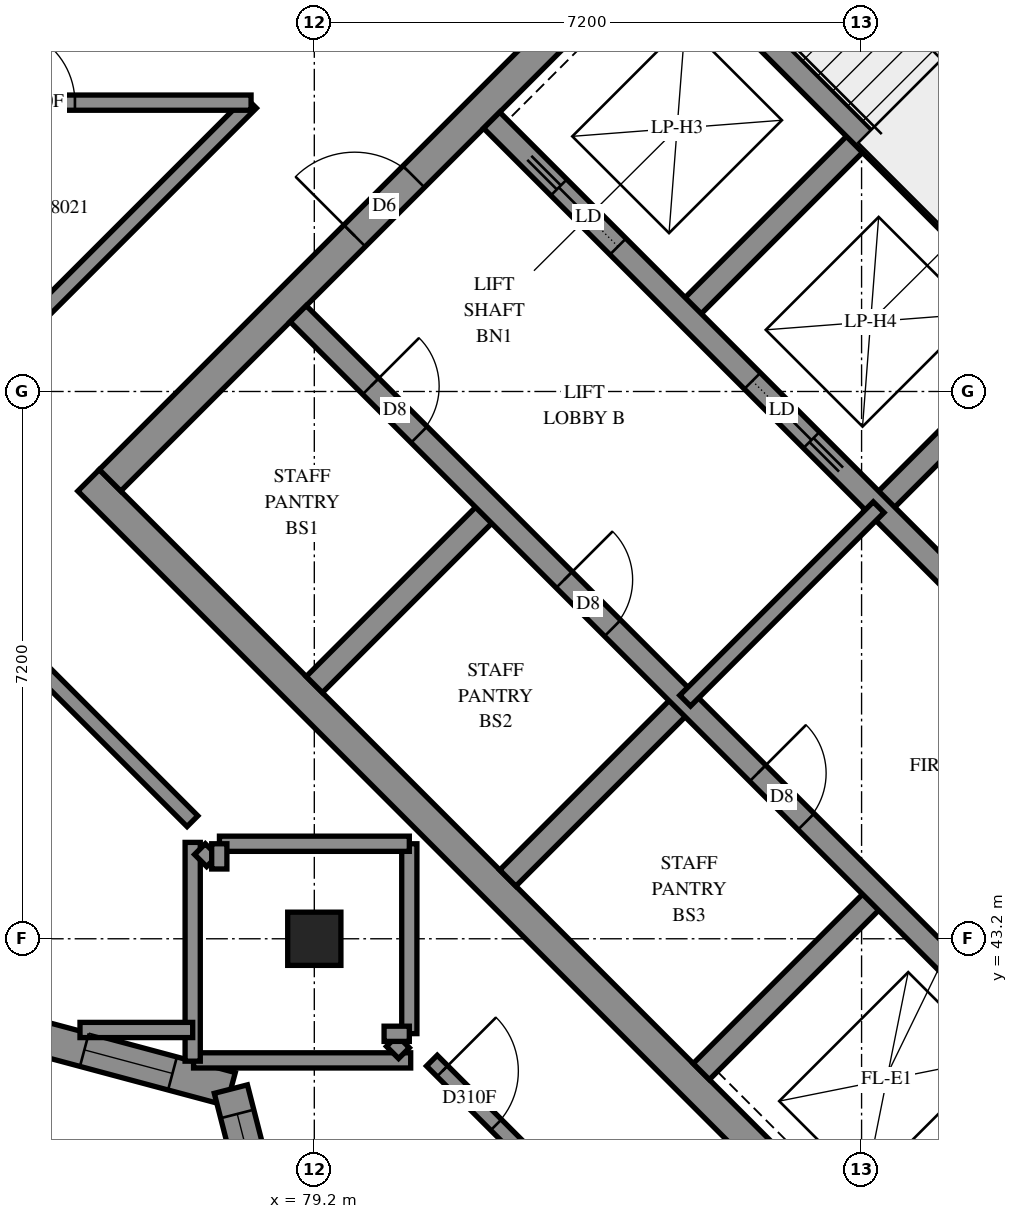
"""IFC4 building model, lengths in metres.
Left out: names, types, materials, properties, quantities, classifications, styles, units other than length and angle.
Written with IfcOpenShell. Run it as: python <this file> out.ifc"""

import sys

from ifc_helpers import new_model, si_unit, direction, frame, frame_2d, origin, origin_2d, place, context, subcontext, project, spatial, polyline, rectangle, outline, extrude, element, fill, save


model = new_model("IFC4")
c1 = context("Model", 3, precision=1e-05, world=origin(), true_north=direction((0.0, 1.0)))
c2 = subcontext(c1, "Body", "Model", "MODEL_VIEW")
j1 = project(units=[si_unit("LENGTHUNIT", "METRE"), si_unit("PLANEANGLEUNIT", "RADIAN")], contexts=[c1])
p1 = place(None, origin())
s1 = spatial("IfcSite", under=j1, at=p1, CompositionType="ELEMENT")
p2 = place(p1, origin())
s2 = spatial("IfcBuilding", under=s1, at=p2, CompositionType="ELEMENT")
p3 = place(p2, frame((0.0, 0.0, 250.6)))
s3 = spatial("IfcBuildingStorey", under=s2, at=p3, CompositionType="ELEMENT", Elevation=250.6)
p4 = place(p3, frame((79.2, 43.2, 0.0), z_axis=(0.0, 0.0, 1.0), x_axis=(1.0, 0.0, 0.0)))
e1 = element("IfcColumn", 1, at=p4, inside=s3, PredefinedType="COLUMN", context=c2, shape_type="SweptSolid", body=[
    extrude(rectangle(XDim=0.7, YDim=0.7, at=origin_2d()), origin(), (0.0, 0.0, 1.0), 3.1),
])
p5 = place(p3, frame((76.23, 49.231, -0.3), z_axis=(0.0, 0.0, 1.0), x_axis=(0.7071034917, -0.7071100706, 0.0)))
e2 = element("IfcWall", 2, at=p5, inside=s3, PredefinedType="SHEAR", context=c2, shape_type="SweptSolid", body=[
    extrude(rectangle(XDim=15.2, YDim=0.4, at=frame_2d((7.6, 0.0))), origin(), (0.0, 0.0, 1.0), 2.7),
])
p6 = place(p3, frame((86.695, 59.696, -0.3), z_axis=(0.0, 0.0, 1.0), x_axis=(0.7071100706, -0.7071034917, 0.0)))
e3 = element("IfcWall", 3, at=p6, inside=s3, PredefinedType="SHEAR", context=c2, shape_type="SweptSolid", body=[
    extrude(rectangle(XDim=15.2, YDim=0.4, at=frame_2d((7.6, 0.0))), origin(), (0.0, 0.0, 1.0), 2.7),
])
p7 = place(p6, frame((10.4, 0.0, 0.3)))
e4 = element("IfcOpeningElement", 4, at=p7, cuts=e3, PredefinedType="OPENING", context=c2, shape_type="SweptSolid", body=[
    extrude(rectangle(XDim=0.8, YDim=2.1, at=frame_2d((0.4, 1.05))), frame((0.0, 0.21, 0.0), z_axis=(0.0, -1.0, 0.0), x_axis=(1.0, 0.0, 0.0)), (0.0, 0.0, 1.0), 0.42),
])
p8 = place(p3, frame((76.513, 49.231, -0.3), z_axis=(0.0, 0.0, 1.0), x_axis=(0.7071067812, 0.7071067812, 0.0)))
e5 = element("IfcWall", 5, at=p8, inside=s3, PredefinedType="SHEAR", context=c2, shape_type="SweptSolid", body=[
    extrude(rectangle(XDim=14.4, YDim=0.4, at=frame_2d((7.2, 0.0))), origin(), (0.0, 0.0, 1.0), 2.7),
])
p9 = place(p8, frame((4.55, 0.0, 0.3)))
e6 = element("IfcOpeningElement", 6, at=p9, cuts=e5, PredefinedType="OPENING", context=c2, shape_type="SweptSolid", body=[
    extrude(rectangle(XDim=1.1, YDim=2.1, at=frame_2d((0.55, 1.05))), frame((0.0, 0.21, 0.0), z_axis=(0.0, -1.0, 0.0), x_axis=(1.0, 0.0, 0.0)), (0.0, 0.0, 1.0), 0.42),
])
p10 = place(p8, frame((11.35, 0.0, 0.3)))
e7 = element("IfcOpeningElement", 7, at=p10, cuts=e5, PredefinedType="OPENING", context=c2, shape_type="SweptSolid", body=[
    extrude(rectangle(XDim=1.1, YDim=2.1, at=frame_2d((0.55, 1.05))), frame((0.0, 0.21, 0.0), z_axis=(0.0, -1.0, 0.0), x_axis=(1.0, 0.0, 0.0)), (0.0, 0.0, 1.0), 0.42),
])
p11 = place(p3, frame((86.978, 38.766, -0.3), z_axis=(0.0, 0.0, 1.0), x_axis=(0.7071067812, 0.7071067812, 0.0)))
e8 = element("IfcWall", 8, at=p11, inside=s3, PredefinedType="SHEAR", context=c2, shape_type="SweptSolid", body=[
    extrude(rectangle(XDim=14.4, YDim=0.4, at=frame_2d((7.2, 0.0))), origin(), (0.0, 0.0, 1.0), 2.7),
])
p12 = place(p11, frame((4.55, 0.0, 0.3)))
e9 = element("IfcOpeningElement", 9, at=p12, cuts=e8, PredefinedType="OPENING", context=c2, shape_type="SweptSolid", body=[
    extrude(rectangle(XDim=1.1, YDim=2.1, at=frame_2d((0.55, 1.05))), frame((0.0, 0.21, 0.0), z_axis=(0.0, -1.0, 0.0), x_axis=(1.0, 0.0, 0.0)), (0.0, 0.0, 1.0), 0.42),
])
p13 = place(p11, frame((11.35, 0.0, 0.3)))
e10 = element("IfcOpeningElement", 10, at=p13, cuts=e8, PredefinedType="OPENING", context=c2, shape_type="SweptSolid", body=[
    extrude(rectangle(XDim=1.1, YDim=2.1, at=frame_2d((0.55, 1.05))), frame((0.0, 0.21, 0.0), z_axis=(0.0, -1.0, 0.0), x_axis=(1.0, 0.0, 0.0)), (0.0, 0.0, 1.0), 0.42),
])
for number, where, z_axis, x_axis in (
    (11, (79.2, 46.544, 0.0), (0.0, 0.0, 1.0), (0.707, 0.707, 0.0)),
    (12, (84.079, 51.423, 0.0), (0.0, 0.0, 1.0), (0.707, 0.707, 0.0)),
):
    element("IfcWall", number, at=place(p3, frame(where, z_axis=z_axis, x_axis=x_axis)), inside=s3, PredefinedType="SOLIDWALL", context=c2, shape_type="SweptSolid", body=[
        extrude(rectangle(XDim=3.3, YDim=0.3, at=frame_2d((1.65, 0.0))), origin(), (0.0, 0.0, 1.0), 3.1),
    ])
p14 = place(p3, frame((81.746, 43.999, 0.0), z_axis=(0.0, 0.0, 1.0), x_axis=(0.7071067812, 0.7071067812, 0.0)))
e13 = element("IfcWall", 13, at=p14, inside=s3, PredefinedType="SOLIDWALL", context=c2, shape_type="SweptSolid", body=[
    extrude(rectangle(XDim=3.3, YDim=0.3, at=frame_2d((1.65, 0.0))), origin(), (0.0, 0.0, 1.0), 3.1),
])
p15 = place(p3, frame((86.625, 48.878, 0.0), z_axis=(0.0, 0.0, 1.0), x_axis=(0.7071067812, 0.7071067812, 0.0)))
e14 = element("IfcWall", 14, at=p15, inside=s3, PredefinedType="SOLIDWALL", context=c2, shape_type="SweptSolid", body=[
    extrude(rectangle(XDim=3.3, YDim=0.3, at=frame_2d((1.65, 0.0))), origin(), (0.0, 0.0, 1.0), 3.1),
])
p16 = place(p3, frame((84.291, 41.453, 0.0), z_axis=(0.0, 0.0, 1.0), x_axis=(0.7071067812, 0.7071067812, 0.0)))
e15 = element("IfcWall", 15, at=p16, inside=s3, PredefinedType="SOLIDWALL", context=c2, shape_type="SweptSolid", body=[
    extrude(rectangle(XDim=3.3, YDim=0.3, at=frame_2d((1.65, 0.0))), origin(), (0.0, 0.0, 1.0), 3.1),
])
p17 = place(p3, frame((78.988, 51.423, 0.0), z_axis=(0.0, 0.0, 1.0), x_axis=(0.7071067812, -0.7071067812, 0.0)))
e16 = element("IfcWall", 16, at=p17, inside=s3, PredefinedType="SOLIDWALL", context=c2, shape_type="SweptSolid", body=[
    extrude(rectangle(XDim=14.4, YDim=0.3, at=frame_2d((7.2, 0.0))), origin(), (0.0, 0.0, 1.0), 3.1),
])
p18 = place(p17, frame((1.35, 0.0, 0.0)))
e17 = element("IfcOpeningElement", 17, at=p18, cuts=e16, PredefinedType="OPENING", context=c2, shape_type="SweptSolid", body=[
    extrude(rectangle(XDim=0.9, YDim=2.1, at=frame_2d((0.45, 1.05))), frame((0.0, 0.16, 0.0), z_axis=(0.0, -1.0, 0.0), x_axis=(1.0, 0.0, 0.0)), (0.0, 0.0, 1.0), 0.32),
])
p19 = place(p17, frame((4.95, 0.0, 0.0)))
e18 = element("IfcOpeningElement", 18, at=p19, cuts=e16, PredefinedType="OPENING", context=c2, shape_type="SweptSolid", body=[
    extrude(rectangle(XDim=0.9, YDim=2.1, at=frame_2d((0.45, 1.05))), frame((0.0, 0.16, 0.0), z_axis=(0.0, -1.0, 0.0), x_axis=(1.0, 0.0, 0.0)), (0.0, 0.0, 1.0), 0.32),
])
p20 = place(p17, frame((8.55, 0.0, 0.0)))
e19 = element("IfcOpeningElement", 19, at=p20, cuts=e16, PredefinedType="OPENING", context=c2, shape_type="SweptSolid", body=[
    extrude(rectangle(XDim=0.9, YDim=2.1, at=frame_2d((0.45, 1.05))), frame((0.0, 0.16, 0.0), z_axis=(0.0, -1.0, 0.0), x_axis=(1.0, 0.0, 0.0)), (0.0, 0.0, 1.0), 0.32),
])
p21 = place(p17, frame((12.05, 0.0, 0.0)))
e20 = element("IfcOpeningElement", 20, at=p21, cuts=e16, PredefinedType="OPENING", context=c2, shape_type="SweptSolid", body=[
    extrude(rectangle(XDim=1.1, YDim=2.1, at=frame_2d((0.55, 1.05))), frame((0.0, 0.16, 0.0), z_axis=(0.0, -1.0, 0.0), x_axis=(1.0, 0.0, 0.0)), (0.0, 0.0, 1.0), 0.32),
])
p22 = place(p3, frame((81.534, 53.969, 0.0), z_axis=(0.0, 0.0, 1.0), x_axis=(0.707103309, -0.7071102534, 0.0)))
e21 = element("IfcWall", 21, at=p22, inside=s3, PredefinedType="SOLIDWALL", context=c2, shape_type="SweptSolid", body=[
    extrude(rectangle(XDim=14.4, YDim=0.3, at=frame_2d((7.2, 0.0))), origin(), (0.0, 0.0, 1.0), 3.1),
])
p23 = place(p22, frame((8.55, 0.0, 0.0)))
e22 = element("IfcOpeningElement", 22, at=p23, cuts=e21, PredefinedType="OPENING", context=c2, shape_type="SweptSolid", body=[
    extrude(rectangle(XDim=0.9, YDim=2.1, at=frame_2d((0.45, 1.05))), frame((0.0, 0.16, 0.0), z_axis=(0.0, -1.0, 0.0), x_axis=(1.0, 0.0, 0.0)), (0.0, 0.0, 1.0), 0.32),
])
p24 = place(p22, frame((1.25, 0.0, 0.0)))
e23 = element("IfcOpeningElement", 23, at=p24, cuts=e21, PredefinedType="OPENING", context=c2, shape_type="SweptSolid", body=[
    extrude(rectangle(XDim=1.1, YDim=2.1, at=frame_2d((0.55, 1.05))), frame((0.0, 0.16, 0.0), z_axis=(0.0, -1.0, 0.0), x_axis=(1.0, 0.0, 0.0)), (0.0, 0.0, 1.0), 0.32),
])
p25 = place(p22, frame((4.85, 0.0, 0.0)))
e24 = element("IfcOpeningElement", 24, at=p25, cuts=e21, PredefinedType="OPENING", context=c2, shape_type="SweptSolid", body=[
    extrude(rectangle(XDim=1.1, YDim=2.1, at=frame_2d((0.55, 1.05))), frame((0.0, 0.16, 0.0), z_axis=(0.0, -1.0, 0.0), x_axis=(1.0, 0.0, 0.0)), (0.0, 0.0, 1.0), 0.32),
])
p26 = place(p22, frame((12.05, 0.0, 0.0)))
e25 = element("IfcOpeningElement", 25, at=p26, cuts=e21, PredefinedType="OPENING", context=c2, shape_type="SweptSolid", body=[
    extrude(rectangle(XDim=1.1, YDim=2.1, at=frame_2d((0.55, 1.05))), frame((0.0, 0.16, 0.0), z_axis=(0.0, -1.0, 0.0), x_axis=(1.0, 0.0, 0.0)), (0.0, 0.0, 1.0), 0.32),
])
p27 = place(p3, frame((83.867, 56.302, 0.0), z_axis=(0.0, 0.0, 1.0), x_axis=(0.7071137256, -0.7070998367, 0.0)))
e26 = element("IfcWall", 26, at=p27, inside=s3, PredefinedType="SOLIDWALL", context=c2, shape_type="SweptSolid", body=[
    extrude(rectangle(XDim=7.2, YDim=0.3, at=frame_2d((3.6, 0.0))), origin(), (0.0, 0.0, 1.0), 3.1),
])
p28 = place(p3, frame((74.346, 42.228, 0.0), z_axis=(0.0, 0.0, 1.0), x_axis=(0.9659805223, -0.2586148306, 0.0)))
e27 = element("IfcWall", 27, at=p28, inside=s3, PredefinedType="SOLIDWALL", context=c2, shape_type="SweptSolid", body=[
    extrude(outline(polyline([(0.041, -0.225), (3.757, -0.225), (4.02, 0.225), (-0.041, 0.225), (0.041, -0.225)])), origin(), (0.0, 0.0, 1.0), 3.1),
])
p29 = place(p28, frame((1.894, 0.0, 0.45)))
e28 = element("IfcOpeningElement", 28, at=p29, cuts=e27, PredefinedType="OPENING", context=c2, shape_type="SweptSolid", body=[
    extrude(rectangle(XDim=1.2, YDim=2.55, at=frame_2d((0.6, 1.275))), frame((0.0, 0.235, 0.0), z_axis=(0.0, -1.0, 0.0), x_axis=(1.0, 0.0, 0.0)), (0.0, 0.0, 1.0), 0.47),
])
p30 = place(p3, frame((78.102, 41.222, 0.0), z_axis=(0.0, 0.0, 1.0), x_axis=(0.2482207273, -0.9687034998, 0.0)))
e29 = element("IfcWall", 29, at=p30, inside=s3, PredefinedType="SOLIDWALL", context=c2, shape_type="SweptSolid", body=[
    extrude(outline(polyline([(0.132, -0.225), (4.842, -0.225), (4.587, 0.225), (-0.132, 0.225), (0.132, -0.225)])), origin(), (0.0, 0.0, 1.0), 3.1),
])
p31 = place(p30, frame((0.337, 0.0, 0.45)))
e30 = element("IfcOpeningElement", 30, at=p31, cuts=e29, PredefinedType="OPENING", context=c2, shape_type="SweptSolid", body=[
    extrude(rectangle(XDim=1.2, YDim=2.55, at=frame_2d((0.6, 1.275))), frame((0.0, 0.235, 0.0), z_axis=(0.0, -1.0, 0.0), x_axis=(1.0, 0.0, 0.0)), (0.0, 0.0, 1.0), 0.47),
])
p32 = place(p30, frame((2.431, 0.0, 0.45)))
e31 = element("IfcOpeningElement", 31, at=p32, cuts=e29, PredefinedType="OPENING", context=c2, shape_type="SweptSolid", body=[
    extrude(rectangle(XDim=1.2, YDim=2.55, at=frame_2d((0.6, 1.275))), frame((0.0, 0.235, 0.0), z_axis=(0.0, -1.0, 0.0), x_axis=(1.0, 0.0, 0.0)), (0.0, 0.0, 1.0), 0.47),
])
p33 = place(p3, frame((84.079, 46.332, 0.0), z_axis=(0.0, 0.0, 1.0), x_axis=(0.7071067812, 0.7071067812, 0.0)))
e32 = element("IfcWall", 32, at=p33, inside=s3, PredefinedType="PARTITIONING", context=c2, shape_type="SweptSolid", body=[
    extrude(rectangle(XDim=3.6, YDim=0.2, at=frame_2d((1.8, 0.0))), origin(), (0.0, 0.0, 1.0), 3.1),
])
p34 = place(p3, frame((80.747, 41.597, 0.0), z_axis=(0.0, 0.0, 1.0), x_axis=(0.7071067812, -0.7071067812, 0.0)))
e33 = element("IfcWall", 33, at=p34, inside=s3, PredefinedType="PARTITIONING", context=c2, shape_type="SweptSolid", body=[
    extrude(rectangle(XDim=8.607, YDim=0.2, at=frame_2d((4.303, 0.0))), origin(), (0.0, 0.0, 1.0), 3.1),
])
p35 = place(p34, frame((0.195, 0.0, 0.0)))
e34 = element("IfcOpeningElement", 34, at=p35, cuts=e33, PredefinedType="OPENING", context=c2, shape_type="SweptSolid", body=[
    extrude(rectangle(XDim=1.0, YDim=2.1, at=frame_2d((0.5, 1.05))), frame((0.0, 0.11, 0.0), z_axis=(0.0, -1.0, 0.0), x_axis=(1.0, 0.0, 0.0)), (0.0, 0.0, 1.0), 0.22),
])
p36 = place(p34, frame((3.133, 0.0, 0.0)))
e35 = element("IfcOpeningElement", 35, at=p36, cuts=e33, PredefinedType="OPENING", context=c2, shape_type="SweptSolid", body=[
    extrude(rectangle(XDim=1.0, YDim=2.1, at=frame_2d((0.5, 1.05))), frame((0.0, 0.11, 0.0), z_axis=(0.0, -1.0, 0.0), x_axis=(1.0, 0.0, 0.0)), (0.0, 0.0, 1.0), 0.22),
])
p37 = place(p3, frame((86.836, 35.514, 0.0), z_axis=(0.0, 0.0, 1.0), x_axis=(0.7071067812, 0.7071067812, 0.0)))
e36 = element("IfcWall", 36, at=p37, inside=s3, PredefinedType="PARTITIONING", context=c2, shape_type="SweptSolid", body=[
    extrude(rectangle(XDim=7.399, YDim=0.2, at=frame_2d((3.7, 0.0))), origin(), (0.0, 0.0, 1.0), 3.1),
])
p38 = place(p37, frame((6.207, 0.0, 0.0)))
e37 = element("IfcOpeningElement", 37, at=p38, cuts=e36, PredefinedType="OPENING", context=c2, shape_type="SweptSolid", body=[
    extrude(rectangle(XDim=1.0, YDim=2.1, at=frame_2d((0.5, 1.05))), frame((0.0, 0.11, 0.0), z_axis=(0.0, -1.0, 0.0), x_axis=(1.0, 0.0, 0.0)), (0.0, 0.0, 1.0), 0.22),
])
p39 = place(p3, frame((74.401, 50.233, 0.0), z_axis=(0.0, 0.0, 1.0), x_axis=(0.7071067812, 0.7071067812, 0.0)))
e38 = element("IfcWall", 38, at=p39, inside=s3, PredefinedType="PARTITIONING", context=c2, shape_type="SweptSolid", body=[
    extrude(rectangle(XDim=5.609, YDim=0.2, at=frame_2d((2.804, 0.0))), origin(), (0.0, 0.0, 1.0), 3.1),
])
p40 = place(p3, frame((74.347, 47.997, 0.0), z_axis=(0.0, 0.0, 1.0), x_axis=(0.7071067812, -0.7071067812, 0.0)))
e39 = element("IfcWall", 39, at=p40, inside=s3, PredefinedType="PARTITIONING", context=c2, shape_type="SweptSolid", body=[
    extrude(rectangle(XDim=4.596, YDim=0.2, at=frame_2d((2.298, 0.0))), origin(), (0.0, 0.0, 1.0), 3.1),
])
p41 = place(p40, frame((0.401, 0.0, 0.0)))
e40 = element("IfcOpeningElement", 40, at=p41, cuts=e39, PredefinedType="OPENING", context=c2, shape_type="SweptSolid", body=[
    extrude(rectangle(XDim=1.0, YDim=2.1, at=frame_2d((0.5, 1.05))), frame((0.0, 0.11, 0.0), z_axis=(0.0, -1.0, 0.0), x_axis=(1.0, 0.0, 0.0)), (0.0, 0.0, 1.0), 0.22),
])
p42 = place(p3, frame((74.402, 54.2, 0.0), z_axis=(0.0, 0.0, 1.0), x_axis=(1.0, 0.0, 0.0)))
e41 = element("IfcWall", 41, at=p42, inside=s3, PredefinedType="PARTITIONING", context=c2, shape_type="SweptSolid", body=[
    extrude(rectangle(XDim=3.966, YDim=0.2, at=frame_2d((1.983, 0.0))), origin(), (0.0, 0.0, 1.0), 3.1),
])
p43 = place(p42, frame((0.649, 0.0, 0.0)))
e42 = element("IfcOpeningElement", 42, at=p43, cuts=e41, PredefinedType="OPENING", context=c2, shape_type="SweptSolid", body=[
    extrude(rectangle(XDim=1.0, YDim=2.1, at=frame_2d((0.5, 1.05))), frame((0.0, 0.11, 0.0), z_axis=(0.0, -1.0, 0.0), x_axis=(1.0, 0.0, 0.0)), (0.0, 0.0, 1.0), 0.22),
])
p44 = place(p3, frame((77.612, 41.6, 0.0), z_axis=(0.0, 0.0, 1.0), x_axis=(1.0, 0.0, 0.0)))
e43 = element("IfcWall", 43, at=p44, inside=s3, PredefinedType="PARTITIONING", context=c2, shape_type="SweptSolid", body=[
    extrude(rectangle(XDim=2.857, YDim=0.2, at=frame_2d((1.428, 0.0))), origin(), (0.0, 0.0, 1.0), 3.1),
])
p45 = place(p3, frame((77.6, 41.59, 0.0), z_axis=(0.0, 0.0, 1.0), x_axis=(0.0, 1.0, 0.0)))
e44 = element("IfcWall", 44, at=p45, inside=s3, PredefinedType="PARTITIONING", context=c2, shape_type="SweptSolid", body=[
    extrude(rectangle(XDim=2.878, YDim=0.2, at=frame_2d((1.439, 0.0))), origin(), (0.0, 0.0, 1.0), 3.1),
])
for number, where, z_axis, x_axis in (
    (45, (80.45, 41.952, 0.0), (0.0, 0.0, 1.0), (0.0, 1.0, 0.0)),
    (46, (77.952, 44.45, 0.0), (0.0, 0.0, 1.0), (1.0, 0.0, 0.0)),
):
    element("IfcWall", number, at=place(p3, frame(where, z_axis=z_axis, x_axis=x_axis)), inside=s3, PredefinedType="PARTITIONING", context=c2, shape_type="SweptSolid", body=[
        extrude(rectangle(XDim=2.498, YDim=0.2, at=frame_2d((1.249, 0.0))), origin(), (0.0, 0.0, 1.0), 3.1),
    ])
p46 = place(p3, frame((76.117, 42.0, 0.0), z_axis=(0.0, 0.0, 1.0), x_axis=(1.0, 0.0, 0.0)))
e47 = element("IfcWall", 47, at=p46, inside=s3, PredefinedType="PARTITIONING", context=c2, shape_type="SweptSolid", body=[
    extrude(rectangle(XDim=1.483, YDim=0.2, at=frame_2d((0.741, 0.0))), origin(), (0.0, 0.0, 1.0), 3.1),
])
for number, where, z_axis, x_axis in (
    (48, (80.221, 41.855, 0.0), (0.0, 0.0, 1.0), (0.707, -0.707, 0.0)),
    (49, (77.695, 44.38, 0.0), (0.0, 0.0, 1.0), (0.707, -0.707, 0.0)),
):
    element("IfcWall", number, at=place(p3, frame(where, z_axis=z_axis, x_axis=x_axis)), inside=s3, PredefinedType="PARTITIONING", context=c2, shape_type="SweptSolid", body=[
        extrude(rectangle(XDim=0.225, YDim=0.2, at=frame_2d((0.112, 0.0))), origin(), (0.0, 0.0, 1.0), 3.1),
    ])
for number, where, z_axis, x_axis in (
    (50, (80.118, 41.95, 0.0), (0.0, 0.0, 1.0), (1.0, 0.0, 0.0)),
    (51, (77.95, 44.118, 0.0), (0.0, 0.0, 1.0), (0.0, 1.0, 0.0)),
):
    element("IfcWall", number, at=place(p3, frame(where, z_axis=z_axis, x_axis=x_axis)), inside=s3, PredefinedType="PARTITIONING", context=c2, shape_type="SweptSolid", body=[
        extrude(rectangle(XDim=0.332, YDim=0.2, at=frame_2d((0.166, 0.0))), origin(), (0.0, 0.0, 1.0), 3.1),
    ])
p47 = place(p29, origin())
e52 = element("IfcWindow", 52, at=p47, inside=s3, PartitioningType="SINGLE_PANEL", PredefinedType="WINDOW", context=c2, shape_type="SweptSolid", body=[
    extrude(rectangle(XDim=1.2, YDim=2.55, at=frame_2d((0.6, 1.275))), frame((0.0, 0.135, 0.0), z_axis=(0.0, -1.0, 0.0), x_axis=(1.0, 0.0, 0.0)), (0.0, 0.0, 1.0), 0.06),
])
fill(e28, e52)
p48 = place(p31, origin())
e53 = element("IfcWindow", 53, at=p48, inside=s3, PartitioningType="SINGLE_PANEL", PredefinedType="WINDOW", context=c2, shape_type="SweptSolid", body=[
    extrude(rectangle(XDim=1.2, YDim=2.55, at=frame_2d((0.6, 1.275))), frame((0.0, 0.205, 0.0), z_axis=(0.0, -1.0, 0.0), x_axis=(1.0, 0.0, 0.0)), (0.0, 0.0, 1.0), 0.06),
])
fill(e30, e53)
p49 = place(p9, origin())
e54 = element("IfcDoor", 54, at=p49, inside=s3, OperationType="DOUBLE_DOOR_SINGLE_SWING", PredefinedType="DOOR", context=c2, shape_type="SweptSolid", body=[
    extrude(rectangle(XDim=1.1, YDim=2.1, at=frame_2d((0.55, 1.05))), frame((0.0, 0.025, 0.0), z_axis=(0.0, -1.0, 0.0), x_axis=(1.0, 0.0, 0.0)), (0.0, 0.0, 1.0), 0.05),
])
fill(e6, e54)
p50 = place(p18, origin())
e55 = element("IfcDoor", 55, at=p50, inside=s3, OperationType="SINGLE_SWING_LEFT", PredefinedType="DOOR", context=c2, shape_type="SweptSolid", body=[
    extrude(rectangle(XDim=0.9, YDim=2.1, at=frame_2d((0.45, 1.05))), frame((0.0, 0.025, 0.0), z_axis=(0.0, -1.0, 0.0), x_axis=(1.0, 0.0, 0.0)), (0.0, 0.0, 1.0), 0.05),
])
fill(e17, e55)
p51 = place(p19, origin())
e56 = element("IfcDoor", 56, at=p51, inside=s3, OperationType="SINGLE_SWING_LEFT", PredefinedType="DOOR", context=c2, shape_type="SweptSolid", body=[
    extrude(rectangle(XDim=0.9, YDim=2.1, at=frame_2d((0.45, 1.05))), frame((0.0, 0.025, 0.0), z_axis=(0.0, -1.0, 0.0), x_axis=(1.0, 0.0, 0.0)), (0.0, 0.0, 1.0), 0.05),
])
fill(e18, e56)
p52 = place(p20, origin())
e57 = element("IfcDoor", 57, at=p52, inside=s3, OperationType="SINGLE_SWING_LEFT", PredefinedType="DOOR", context=c2, shape_type="SweptSolid", body=[
    extrude(rectangle(XDim=0.9, YDim=2.1, at=frame_2d((0.45, 1.05))), frame((0.0, 0.025, 0.0), z_axis=(0.0, -1.0, 0.0), x_axis=(1.0, 0.0, 0.0)), (0.0, 0.0, 1.0), 0.05),
])
fill(e19, e57)
p53 = place(p24, origin())
e58 = element("IfcDoor", 58, at=p53, inside=s3, OperationType="SLIDING_TO_LEFT", PredefinedType="DOOR", context=c2, shape_type="SweptSolid", body=[
    extrude(rectangle(XDim=1.1, YDim=2.1, at=frame_2d((0.55, 1.05))), frame((0.0, 0.025, 0.0), z_axis=(0.0, -1.0, 0.0), x_axis=(1.0, 0.0, 0.0)), (0.0, 0.0, 1.0), 0.05),
])
fill(e23, e58)
p54 = place(p25, origin())
e59 = element("IfcDoor", 59, at=p54, inside=s3, OperationType="SLIDING_TO_RIGHT", PredefinedType="DOOR", context=c2, shape_type="SweptSolid", body=[
    extrude(rectangle(XDim=1.1, YDim=2.1, at=frame_2d((0.55, 1.05))), frame((0.0, 0.025, 0.0), z_axis=(0.0, -1.0, 0.0), x_axis=(1.0, 0.0, 0.0)), (0.0, 0.0, 1.0), 0.05),
])
fill(e24, e59)
p55 = place(p43, origin())
e60 = element("IfcDoor", 60, at=p55, inside=s3, OperationType="SINGLE_SWING_RIGHT", PredefinedType="DOOR", context=c2, shape_type="SweptSolid", body=[
    extrude(rectangle(XDim=1.0, YDim=2.1, at=frame_2d((0.5, 1.05))), frame((0.0, 0.025, 0.0), z_axis=(0.0, -1.0, 0.0), x_axis=(1.0, 0.0, 0.0)), (0.0, 0.0, 1.0), 0.05),
])
fill(e42, e60)
p56 = place(p35, origin())
e61 = element("IfcDoor", 61, at=p56, inside=s3, OperationType="SINGLE_SWING_LEFT", PredefinedType="DOOR", context=c2, shape_type="SweptSolid", body=[
    extrude(rectangle(XDim=1.0, YDim=2.1, at=frame_2d((0.5, 1.05))), frame((0.0, 0.025, 0.0), z_axis=(0.0, -1.0, 0.0), x_axis=(1.0, 0.0, 0.0)), (0.0, 0.0, 1.0), 0.05),
])
fill(e34, e61)
save(model, sys.argv[1])
